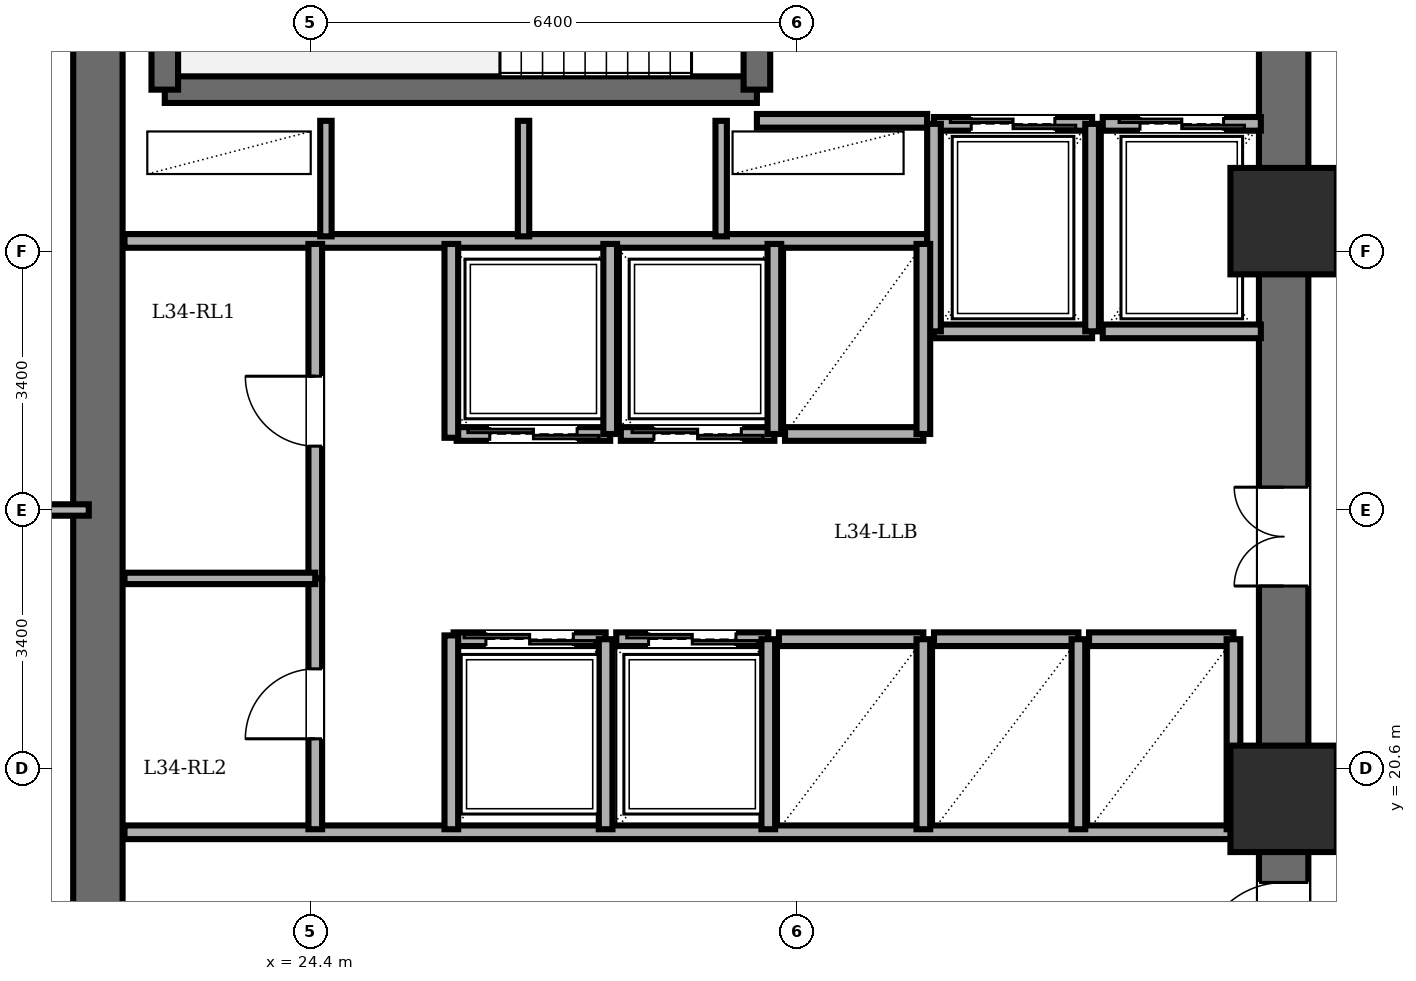
"""IFC4 building model, lengths in metres.
Left out: names, types, materials, properties, quantities, classifications, styles, units other than length and angle.
Written with IfcOpenShell. Run it as: python <this file> out.ifc"""

import sys

from ifc_helpers import new_model, si_unit, direction, frame, frame_2d, origin, origin_2d, place, context, subcontext, project, spatial, rectangle, extrude, element, fill, save


model = new_model("IFC4")
c1 = context("Model", 3, precision=1e-05, world=origin(), true_north=direction((0.0, 1.0)))
c2 = subcontext(c1, "Body", "Model", "MODEL_VIEW")
j1 = project(units=[si_unit("LENGTHUNIT", "METRE"), si_unit("PLANEANGLEUNIT", "RADIAN")], contexts=[c1])
p1 = place(None, origin())
s1 = spatial("IfcSite", under=j1, at=p1, CompositionType="ELEMENT")
p2 = place(p1, origin())
s2 = spatial("IfcBuilding", under=s1, at=p2, CompositionType="ELEMENT")
p3 = place(p2, frame((0.0, 0.0, 129.5)))
s3 = spatial("IfcBuildingStorey", under=s2, at=p3, CompositionType="ELEMENT", Elevation=129.5)
for number, where, z_axis, x_axis in (
    (1, (37.2, 20.2, 0.0), (0.0, 0.0, 1.0), (1.0, 0.0, 0.0)),
    (2, (37.2, 27.8, 0.0), (0.0, 0.0, 1.0), (1.0, 0.0, 0.0)),
):
    element("IfcColumn", number, at=place(p3, frame(where, z_axis=z_axis, x_axis=x_axis)), inside=s3, PredefinedType="COLUMN", context=c2, shape_type="SweptSolid", body=[
        extrude(rectangle(XDim=1.4, YDim=1.4, at=origin_2d()), origin(), (0.0, 0.0, 1.0), 3.6),
    ])
p4 = place(p3, frame((21.6, 14.4, 0.0), z_axis=(0.0, 0.0, 1.0), x_axis=(0.0, 1.0, 0.0)))
e3 = element("IfcWall", 3, at=p4, inside=s3, PredefinedType="SHEAR", context=c2, shape_type="SweptSolid", body=[
    extrude(rectangle(XDim=19.2, YDim=0.65, at=frame_2d((9.6, 0.0))), origin(), (0.0, 0.0, 1.0), 3.36),
])
p5 = place(p3, frame((37.2, 14.4, 0.0), z_axis=(0.0, 0.0, 1.0), x_axis=(0.0, 1.0, 0.0)))
e4 = element("IfcWall", 4, at=p5, inside=s3, PredefinedType="SHEAR", context=c2, shape_type="SweptSolid", body=[
    extrude(rectangle(XDim=19.2, YDim=0.65, at=frame_2d((9.6, 0.0))), origin(), (0.0, 0.0, 1.0), 3.36),
])
p6 = place(p5, frame((15.8, 0.0, 0.0)))
e5 = element("IfcOpeningElement", 5, at=p6, cuts=e4, PredefinedType="OPENING", context=c2, shape_type="SweptSolid", body=[
    extrude(rectangle(XDim=1.15, YDim=2.15, at=frame_2d((0.575, 1.075))), frame((0.0, 0.335, 0.0), z_axis=(0.0, -1.0, 0.0), x_axis=(1.0, 0.0, 0.0)), (0.0, 0.0, 1.0), 0.67),
])
p7 = place(p5, frame((3.6, 0.0, 0.0)))
e6 = element("IfcOpeningElement", 6, at=p7, cuts=e4, PredefinedType="OPENING", context=c2, shape_type="SweptSolid", body=[
    extrude(rectangle(XDim=1.1, YDim=2.15, at=frame_2d((0.55, 1.075))), frame((0.0, 0.335, 0.0), z_axis=(0.0, -1.0, 0.0), x_axis=(1.0, 0.0, 0.0)), (0.0, 0.0, 1.0), 0.67),
])
p8 = place(p5, frame((8.6, 0.0, 0.0)))
e7 = element("IfcOpeningElement", 7, at=p8, cuts=e4, PredefinedType="OPENING", context=c2, shape_type="SweptSolid", body=[
    extrude(rectangle(XDim=1.3, YDim=2.2, at=frame_2d((0.65, 1.1))), frame((0.0, 0.335, 0.0), z_axis=(0.0, -1.0, 0.0), x_axis=(1.0, 0.0, 0.0)), (0.0, 0.0, 1.0), 0.67),
])
p9 = place(p3, frame((22.48, 29.53, 0.0), z_axis=(0.0, 0.0, 1.0), x_axis=(1.0, 0.0, 0.0)))
e8 = element("IfcWall", 8, at=p9, inside=s3, PredefinedType="SOLIDWALL", context=c2, shape_type="SweptSolid", body=[
    extrude(rectangle(XDim=7.79, YDim=0.35, at=frame_2d((3.895, 0.0))), origin(), (0.0, 0.0, 1.0), 3.36),
])
p10 = place(p3, frame((22.48, 29.53, 0.0), z_axis=(0.0, 0.0, 1.0), x_axis=(0.0, 1.0, 0.0)))
e9 = element("IfcWall", 9, at=p10, inside=s3, PredefinedType="SOLIDWALL", context=c2, shape_type="SweptSolid", body=[
    extrude(rectangle(XDim=3.58, YDim=0.35, at=frame_2d((1.79, 0.0))), origin(), (0.0, 0.0, 1.0), 3.36),
])
p11 = place(p3, frame((30.27, 29.53, 0.0), z_axis=(0.0, 0.0, 1.0), x_axis=(0.0, 1.0, 0.0)))
e10 = element("IfcWall", 10, at=p11, inside=s3, PredefinedType="SOLIDWALL", context=c2, shape_type="SweptSolid", body=[
    extrude(rectangle(XDim=3.58, YDim=0.35, at=frame_2d((1.79, 0.0))), origin(), (0.0, 0.0, 1.0), 3.36),
])
p12 = place(p11, frame((1.25, 0.0, 0.0)))
e11 = element("IfcOpeningElement", 11, at=p12, cuts=e10, PredefinedType="OPENING", context=c2, shape_type="SweptSolid", body=[
    extrude(rectangle(XDim=1.1, YDim=2.15, at=frame_2d((0.55, 1.075))), frame((0.0, 0.185, 0.0), z_axis=(0.0, -1.0, 0.0), x_axis=(1.0, 0.0, 0.0)), (0.0, 0.0, 1.0), 0.37),
])
p13 = place(p3, frame((30.27, 29.12, 0.0), z_axis=(0.0, 0.0, 1.0), x_axis=(1.0, 0.0, 0.0)))
e12 = element("IfcWall", 12, at=p13, inside=s3, PredefinedType="PARTITIONING", context=c2, shape_type="SweptSolid", body=[
    extrude(rectangle(XDim=2.24, YDim=0.18, at=frame_2d((1.12, 0.0))), origin(), (0.0, 0.0, 1.0), 3.36),
])
p14 = place(p3, frame((21.95, 27.54, 0.0), z_axis=(0.0, 0.0, 1.0), x_axis=(1.0, 0.0, 0.0)))
e13 = element("IfcWall", 13, at=p14, inside=s3, PredefinedType="PARTITIONING", context=c2, shape_type="SweptSolid", body=[
    extrude(rectangle(XDim=10.56, YDim=0.18, at=frame_2d((5.28, 0.0))), origin(), (0.0, 0.0, 1.0), 3.36),
])
for number, where, z_axis, x_axis in (
    (14, (24.6, 27.6, 0.0), (0.0, 0.0, 1.0), (0.0, 1.0, 0.0)),
    (15, (27.2, 27.6, 0.0), (0.0, 0.0, 1.0), (0.0, 1.0, 0.0)),
    (16, (29.8, 27.6, 0.0), (0.0, 0.0, 1.0), (0.0, 1.0, 0.0)),
):
    element("IfcWall", number, at=place(p3, frame(where, z_axis=z_axis, x_axis=x_axis)), inside=s3, PredefinedType="PARTITIONING", context=c2, shape_type="SweptSolid", body=[
        extrude(rectangle(XDim=1.52, YDim=0.15, at=frame_2d((0.76, 0.0))), origin(), (0.0, 0.0, 1.0), 3.36),
    ])
p15 = place(p3, frame((21.95, 19.76, 0.0), z_axis=(0.0, 0.0, 1.0), x_axis=(1.0, 0.0, 0.0)))
e17 = element("IfcWall", 17, at=p15, inside=s3, PredefinedType="PARTITIONING", context=c2, shape_type="SweptSolid", body=[
    extrude(rectangle(XDim=14.87, YDim=0.18, at=frame_2d((7.435, 0.0))), origin(), (0.0, 0.0, 1.0), 3.36),
])
p16 = place(p3, frame((32.6, 29.08, 0.0), z_axis=(0.0, 0.0, 1.0), x_axis=(1.0, 0.0, 0.0)))
e18 = element("IfcWall", 18, at=p16, inside=s3, PredefinedType="PARTITIONING", context=c2, shape_type="SweptSolid", body=[
    extrude(rectangle(XDim=2.08, YDim=0.18, at=frame_2d((1.04, 0.0))), origin(), (0.0, 0.0, 1.0), 3.36),
])
p17 = place(p16, frame((0.49, 0.0, 0.0)))
e19 = element("IfcOpeningElement", 19, at=p17, cuts=e18, PredefinedType="OPENING", context=c2, shape_type="SweptSolid", body=[
    extrude(rectangle(XDim=1.1, YDim=2.2, at=frame_2d((0.55, 1.1))), frame((0.0, 0.1, 0.0), z_axis=(0.0, -1.0, 0.0), x_axis=(1.0, 0.0, 0.0)), (0.0, 0.0, 1.0), 0.2),
])
p18 = place(p3, frame((34.68, 26.35, 0.0), z_axis=(0.0, 0.0, 1.0), x_axis=(-1.0, 0.0, 0.0)))
e20 = element("IfcWall", 20, at=p18, inside=s3, PredefinedType="PARTITIONING", context=c2, shape_type="SweptSolid", body=[
    extrude(rectangle(XDim=2.08, YDim=0.18, at=frame_2d((1.04, 0.0))), origin(), (0.0, 0.0, 1.0), 3.36),
])
for number, where, z_axis, x_axis in (
    (21, (34.68, 26.35, 0.0), (0.0, 0.0, 1.0), (0.0, 1.0, 0.0)),
    (22, (32.6, 29.08, 0.0), (0.0, 0.0, 1.0), (0.0, -1.0, 0.0)),
):
    element("IfcWall", number, at=place(p3, frame(where, z_axis=z_axis, x_axis=x_axis)), inside=s3, PredefinedType="PARTITIONING", context=c2, shape_type="SweptSolid", body=[
        extrude(rectangle(XDim=2.73, YDim=0.18, at=frame_2d((1.365, 0.0))), origin(), (0.0, 0.0, 1.0), 3.36),
    ])
p19 = place(p3, frame((34.82, 29.08, 0.0), z_axis=(0.0, 0.0, 1.0), x_axis=(1.0, 0.0, 0.0)))
e23 = element("IfcWall", 23, at=p19, inside=s3, PredefinedType="PARTITIONING", context=c2, shape_type="SweptSolid", body=[
    extrude(rectangle(XDim=2.08, YDim=0.18, at=frame_2d((1.04, 0.0))), origin(), (0.0, 0.0, 1.0), 3.36),
])
p20 = place(p19, frame((0.49, 0.0, 0.0)))
e24 = element("IfcOpeningElement", 24, at=p20, cuts=e23, PredefinedType="OPENING", context=c2, shape_type="SweptSolid", body=[
    extrude(rectangle(XDim=1.1, YDim=2.2, at=frame_2d((0.55, 1.1))), frame((0.0, 0.1, 0.0), z_axis=(0.0, -1.0, 0.0), x_axis=(1.0, 0.0, 0.0)), (0.0, 0.0, 1.0), 0.2),
])
p21 = place(p3, frame((36.9, 26.35, 0.0), z_axis=(0.0, 0.0, 1.0), x_axis=(-1.0, 0.0, 0.0)))
e25 = element("IfcWall", 25, at=p21, inside=s3, PredefinedType="PARTITIONING", context=c2, shape_type="SweptSolid", body=[
    extrude(rectangle(XDim=2.08, YDim=0.18, at=frame_2d((1.04, 0.0))), origin(), (0.0, 0.0, 1.0), 3.36),
])
p22 = place(p3, frame((28.34, 25.0, 0.0), z_axis=(0.0, 0.0, 1.0), x_axis=(-1.0, 0.0, 0.0)))
e26 = element("IfcWall", 26, at=p22, inside=s3, PredefinedType="PARTITIONING", context=c2, shape_type="SweptSolid", body=[
    extrude(rectangle(XDim=2.02, YDim=0.18, at=frame_2d((1.01, 0.0))), origin(), (0.0, 0.0, 1.0), 3.36),
])
p23 = place(p22, frame((0.435, 0.0, 0.0)))
e27 = element("IfcOpeningElement", 27, at=p23, cuts=e26, PredefinedType="OPENING", context=c2, shape_type="SweptSolid", body=[
    extrude(rectangle(XDim=1.15, YDim=2.2, at=frame_2d((0.575, 1.1))), frame((0.0, 0.1, 0.0), z_axis=(0.0, -1.0, 0.0), x_axis=(1.0, 0.0, 0.0)), (0.0, 0.0, 1.0), 0.2),
])
p24 = place(p3, frame((28.34, 25.0, 0.0), z_axis=(0.0, 0.0, 1.0), x_axis=(0.0, 1.0, 0.0)))
e28 = element("IfcWall", 28, at=p24, inside=s3, PredefinedType="PARTITIONING", context=c2, shape_type="SweptSolid", body=[
    extrude(rectangle(XDim=2.5, YDim=0.18, at=frame_2d((1.25, 0.0))), origin(), (0.0, 0.0, 1.0), 3.36),
])
p25 = place(p3, frame((30.5, 25.0, 0.0), z_axis=(0.0, 0.0, 1.0), x_axis=(-1.0, 0.0, 0.0)))
e29 = element("IfcWall", 29, at=p25, inside=s3, PredefinedType="PARTITIONING", context=c2, shape_type="SweptSolid", body=[
    extrude(rectangle(XDim=2.02, YDim=0.18, at=frame_2d((1.01, 0.0))), origin(), (0.0, 0.0, 1.0), 3.36),
])
p26 = place(p25, frame((0.435, 0.0, 0.0)))
e30 = element("IfcOpeningElement", 30, at=p26, cuts=e29, PredefinedType="OPENING", context=c2, shape_type="SweptSolid", body=[
    extrude(rectangle(XDim=1.15, YDim=2.2, at=frame_2d((0.575, 1.1))), frame((0.0, 0.1, 0.0), z_axis=(0.0, -1.0, 0.0), x_axis=(1.0, 0.0, 0.0)), (0.0, 0.0, 1.0), 0.2),
])
p27 = place(p3, frame((30.5, 25.0, 0.0), z_axis=(0.0, 0.0, 1.0), x_axis=(0.0, 1.0, 0.0)))
e31 = element("IfcWall", 31, at=p27, inside=s3, PredefinedType="PARTITIONING", context=c2, shape_type="SweptSolid", body=[
    extrude(rectangle(XDim=2.5, YDim=0.18, at=frame_2d((1.25, 0.0))), origin(), (0.0, 0.0, 1.0), 3.36),
])
p28 = place(p3, frame((26.28, 22.3, 0.0), z_axis=(0.0, 0.0, 1.0), x_axis=(1.0, 0.0, 0.0)))
e32 = element("IfcWall", 32, at=p28, inside=s3, PredefinedType="PARTITIONING", context=c2, shape_type="SweptSolid", body=[
    extrude(rectangle(XDim=2.0, YDim=0.18, at=frame_2d((1.0, 0.0))), origin(), (0.0, 0.0, 1.0), 3.36),
])
p29 = place(p28, frame((0.425, 0.0, 0.0)))
e33 = element("IfcOpeningElement", 33, at=p29, cuts=e32, PredefinedType="OPENING", context=c2, shape_type="SweptSolid", body=[
    extrude(rectangle(XDim=1.15, YDim=2.2, at=frame_2d((0.575, 1.1))), frame((0.0, 0.1, 0.0), z_axis=(0.0, -1.0, 0.0), x_axis=(1.0, 0.0, 0.0)), (0.0, 0.0, 1.0), 0.2),
])
p30 = place(p3, frame((28.28, 19.8, 0.0), z_axis=(0.0, 0.0, 1.0), x_axis=(0.0, 1.0, 0.0)))
e34 = element("IfcWall", 34, at=p30, inside=s3, PredefinedType="PARTITIONING", context=c2, shape_type="SweptSolid", body=[
    extrude(rectangle(XDim=2.5, YDim=0.18, at=frame_2d((1.25, 0.0))), origin(), (0.0, 0.0, 1.0), 3.36),
])
p31 = place(p3, frame((28.42, 22.3, 0.0), z_axis=(0.0, 0.0, 1.0), x_axis=(1.0, 0.0, 0.0)))
e35 = element("IfcWall", 35, at=p31, inside=s3, PredefinedType="PARTITIONING", context=c2, shape_type="SweptSolid", body=[
    extrude(rectangle(XDim=2.0, YDim=0.18, at=frame_2d((1.0, 0.0))), origin(), (0.0, 0.0, 1.0), 3.36),
])
p32 = place(p31, frame((0.425, 0.0, 0.0)))
e36 = element("IfcOpeningElement", 36, at=p32, cuts=e35, PredefinedType="OPENING", context=c2, shape_type="SweptSolid", body=[
    extrude(rectangle(XDim=1.15, YDim=2.2, at=frame_2d((0.575, 1.1))), frame((0.0, 0.1, 0.0), z_axis=(0.0, -1.0, 0.0), x_axis=(1.0, 0.0, 0.0)), (0.0, 0.0, 1.0), 0.2),
])
p33 = place(p3, frame((30.42, 19.8, 0.0), z_axis=(0.0, 0.0, 1.0), x_axis=(0.0, 1.0, 0.0)))
e37 = element("IfcWall", 37, at=p33, inside=s3, PredefinedType="PARTITIONING", context=c2, shape_type="SweptSolid", body=[
    extrude(rectangle(XDim=2.5, YDim=0.18, at=frame_2d((1.25, 0.0))), origin(), (0.0, 0.0, 1.0), 3.36),
])
p34 = place(p3, frame((32.46, 25.0, 0.0), z_axis=(0.0, 0.0, 1.0), x_axis=(-1.0, 0.0, 0.0)))
e38 = element("IfcWall", 38, at=p34, inside=s3, PredefinedType="PARTITIONING", context=c2, shape_type="SweptSolid", body=[
    extrude(rectangle(XDim=1.82, YDim=0.18, at=frame_2d((0.91, 0.0))), origin(), (0.0, 0.0, 1.0), 3.36),
])
p35 = place(p3, frame((32.46, 25.0, 0.0), z_axis=(0.0, 0.0, 1.0), x_axis=(0.0, 1.0, 0.0)))
e39 = element("IfcWall", 39, at=p35, inside=s3, PredefinedType="PARTITIONING", context=c2, shape_type="SweptSolid", body=[
    extrude(rectangle(XDim=2.5, YDim=0.18, at=frame_2d((1.25, 0.0))), origin(), (0.0, 0.0, 1.0), 3.36),
])
p36 = place(p3, frame((30.56, 22.3, 0.0), z_axis=(0.0, 0.0, 1.0), x_axis=(1.0, 0.0, 0.0)))
e40 = element("IfcWall", 40, at=p36, inside=s3, PredefinedType="PARTITIONING", context=c2, shape_type="SweptSolid", body=[
    extrude(rectangle(XDim=1.9, YDim=0.18, at=frame_2d((0.95, 0.0))), origin(), (0.0, 0.0, 1.0), 3.36),
])
p37 = place(p3, frame((32.46, 19.8, 0.0), z_axis=(0.0, 0.0, 1.0), x_axis=(0.0, 1.0, 0.0)))
e41 = element("IfcWall", 41, at=p37, inside=s3, PredefinedType="PARTITIONING", context=c2, shape_type="SweptSolid", body=[
    extrude(rectangle(XDim=2.5, YDim=0.18, at=frame_2d((1.25, 0.0))), origin(), (0.0, 0.0, 1.0), 3.36),
])
p38 = place(p3, frame((32.6, 22.3, 0.0), z_axis=(0.0, 0.0, 1.0), x_axis=(1.0, 0.0, 0.0)))
e42 = element("IfcWall", 42, at=p38, inside=s3, PredefinedType="PARTITIONING", context=c2, shape_type="SweptSolid", body=[
    extrude(rectangle(XDim=1.9, YDim=0.18, at=frame_2d((0.95, 0.0))), origin(), (0.0, 0.0, 1.0), 3.36),
])
p39 = place(p3, frame((34.5, 19.8, 0.0), z_axis=(0.0, 0.0, 1.0), x_axis=(0.0, 1.0, 0.0)))
e43 = element("IfcWall", 43, at=p39, inside=s3, PredefinedType="PARTITIONING", context=c2, shape_type="SweptSolid", body=[
    extrude(rectangle(XDim=2.5, YDim=0.18, at=frame_2d((1.25, 0.0))), origin(), (0.0, 0.0, 1.0), 3.36),
])
p40 = place(p3, frame((34.64, 22.3, 0.0), z_axis=(0.0, 0.0, 1.0), x_axis=(1.0, 0.0, 0.0)))
e44 = element("IfcWall", 44, at=p40, inside=s3, PredefinedType="PARTITIONING", context=c2, shape_type="SweptSolid", body=[
    extrude(rectangle(XDim=1.9, YDim=0.18, at=frame_2d((0.95, 0.0))), origin(), (0.0, 0.0, 1.0), 3.36),
])
p41 = place(p3, frame((36.54, 19.8, 0.0), z_axis=(0.0, 0.0, 1.0), x_axis=(0.0, 1.0, 0.0)))
e45 = element("IfcWall", 45, at=p41, inside=s3, PredefinedType="PARTITIONING", context=c2, shape_type="SweptSolid", body=[
    extrude(rectangle(XDim=2.5, YDim=0.18, at=frame_2d((1.25, 0.0))), origin(), (0.0, 0.0, 1.0), 3.36),
])
p42 = place(p3, frame((24.46, 23.1, 0.0), z_axis=(0.0, 0.0, 1.0), x_axis=(0.0, 1.0, 0.0)))
e46 = element("IfcWall", 46, at=p42, inside=s3, PredefinedType="PARTITIONING", context=c2, shape_type="SweptSolid", body=[
    extrude(rectangle(XDim=4.4, YDim=0.18, at=frame_2d((2.2, 0.0))), origin(), (0.0, 0.0, 1.0), 3.36),
])
p43 = place(p42, frame((1.74, 0.0, 0.0)))
e47 = element("IfcOpeningElement", 47, at=p43, cuts=e46, PredefinedType="OPENING", context=c2, shape_type="SweptSolid", body=[
    extrude(rectangle(XDim=0.92, YDim=2.1, at=frame_2d((0.46, 1.05))), frame((0.0, 0.1, 0.0), z_axis=(0.0, -1.0, 0.0), x_axis=(1.0, 0.0, 0.0)), (0.0, 0.0, 1.0), 0.2),
])
p44 = place(p3, frame((24.46, 19.8, 0.0), z_axis=(0.0, 0.0, 1.0), x_axis=(0.0, 1.0, 0.0)))
e48 = element("IfcWall", 48, at=p44, inside=s3, PredefinedType="PARTITIONING", context=c2, shape_type="SweptSolid", body=[
    extrude(rectangle(XDim=3.3, YDim=0.18, at=frame_2d((1.65, 0.0))), origin(), (0.0, 0.0, 1.0), 3.36),
])
p45 = place(p44, frame((1.19, 0.0, 0.0)))
e49 = element("IfcOpeningElement", 49, at=p45, cuts=e48, PredefinedType="OPENING", context=c2, shape_type="SweptSolid", body=[
    extrude(rectangle(XDim=0.92, YDim=2.1, at=frame_2d((0.46, 1.05))), frame((0.0, 0.1, 0.0), z_axis=(0.0, -1.0, 0.0), x_axis=(1.0, 0.0, 0.0)), (0.0, 0.0, 1.0), 0.2),
])
p46 = place(p3, frame((21.95, 23.1, 0.0), z_axis=(0.0, 0.0, 1.0), x_axis=(1.0, 0.0, 0.0)))
e50 = element("IfcWall", 50, at=p46, inside=s3, PredefinedType="PARTITIONING", context=c2, shape_type="SweptSolid", body=[
    extrude(rectangle(XDim=2.51, YDim=0.15, at=frame_2d((1.255, 0.0))), origin(), (0.0, 0.0, 1.0), 3.36),
])
for number, where, z_axis, x_axis in (
    (51, (26.25, 24.95, 0.0), (0.0, 0.0, 1.0), (0.0, 1.0, 0.0)),
    (52, (26.25, 19.8, 0.0), (0.0, 0.0, 1.0), (0.0, 1.0, 0.0)),
):
    element("IfcWall", number, at=place(p3, frame(where, z_axis=z_axis, x_axis=x_axis)), inside=s3, PredefinedType="PARTITIONING", context=c2, shape_type="SweptSolid", body=[
        extrude(rectangle(XDim=2.55, YDim=0.18, at=frame_2d((1.275, 0.0))), origin(), (0.0, 0.0, 1.0), 3.36),
    ])
p47 = place(p3, frame((8.8, 24.0, 0.0), z_axis=(0.0, 0.0, 1.0), x_axis=(1.0, 0.0, 0.0)))
e53 = element("IfcWall", 53, at=p47, inside=s3, PredefinedType="PARTITIONING", context=c2, shape_type="SweptSolid", body=[
    extrude(rectangle(XDim=12.68, YDim=0.15, at=frame_2d((6.34, 0.0))), origin(), (0.0, 0.0, 1.0), 3.36),
])
p48 = place(p7, origin())
e54 = element("IfcDoor", 54, at=p48, inside=s3, OperationType="SINGLE_SWING_LEFT", PredefinedType="DOOR", context=c2, shape_type="SweptSolid", body=[
    extrude(rectangle(XDim=1.1, YDim=2.15, at=frame_2d((0.55, 1.075))), frame((0.0, 0.025, 0.0), z_axis=(0.0, -1.0, 0.0), x_axis=(1.0, 0.0, 0.0)), (0.0, 0.0, 1.0), 0.05),
])
fill(e6, e54)
p49 = place(p17, origin())
e55 = element("IfcDoor", 55, at=p49, inside=s3, OperationType="DOUBLE_DOOR_SLIDING", PredefinedType="DOOR", context=c2, shape_type="SweptSolid", body=[
    extrude(rectangle(XDim=1.1, YDim=2.2, at=frame_2d((0.55, 1.1))), frame((0.0, 0.025, 0.0), z_axis=(0.0, -1.0, 0.0), x_axis=(1.0, 0.0, 0.0)), (0.0, 0.0, 1.0), 0.05),
])
fill(e19, e55)
p50 = place(p20, origin())
e56 = element("IfcDoor", 56, at=p50, inside=s3, OperationType="DOUBLE_DOOR_SLIDING", PredefinedType="DOOR", context=c2, shape_type="SweptSolid", body=[
    extrude(rectangle(XDim=1.1, YDim=2.2, at=frame_2d((0.55, 1.1))), frame((0.0, 0.025, 0.0), z_axis=(0.0, -1.0, 0.0), x_axis=(1.0, 0.0, 0.0)), (0.0, 0.0, 1.0), 0.05),
])
fill(e24, e56)
p51 = place(p23, origin())
e57 = element("IfcDoor", 57, at=p51, inside=s3, OperationType="DOUBLE_DOOR_SLIDING", PredefinedType="DOOR", context=c2, shape_type="SweptSolid", body=[
    extrude(rectangle(XDim=1.15, YDim=2.2, at=frame_2d((0.575, 1.1))), frame((0.0, 0.025, 0.0), z_axis=(0.0, -1.0, 0.0), x_axis=(1.0, 0.0, 0.0)), (0.0, 0.0, 1.0), 0.05),
])
fill(e27, e57)
p52 = place(p26, origin())
e58 = element("IfcDoor", 58, at=p52, inside=s3, OperationType="DOUBLE_DOOR_SLIDING", PredefinedType="DOOR", context=c2, shape_type="SweptSolid", body=[
    extrude(rectangle(XDim=1.15, YDim=2.2, at=frame_2d((0.575, 1.1))), frame((0.0, 0.025, 0.0), z_axis=(0.0, -1.0, 0.0), x_axis=(1.0, 0.0, 0.0)), (0.0, 0.0, 1.0), 0.05),
])
fill(e30, e58)
p53 = place(p29, origin())
e59 = element("IfcDoor", 59, at=p53, inside=s3, OperationType="DOUBLE_DOOR_SLIDING", PredefinedType="DOOR", context=c2, shape_type="SweptSolid", body=[
    extrude(rectangle(XDim=1.15, YDim=2.2, at=frame_2d((0.575, 1.1))), frame((0.0, 0.025, 0.0), z_axis=(0.0, -1.0, 0.0), x_axis=(1.0, 0.0, 0.0)), (0.0, 0.0, 1.0), 0.05),
])
fill(e33, e59)
p54 = place(p32, origin())
e60 = element("IfcDoor", 60, at=p54, inside=s3, OperationType="DOUBLE_DOOR_SLIDING", PredefinedType="DOOR", context=c2, shape_type="SweptSolid", body=[
    extrude(rectangle(XDim=1.15, YDim=2.2, at=frame_2d((0.575, 1.1))), frame((0.0, 0.025, 0.0), z_axis=(0.0, -1.0, 0.0), x_axis=(1.0, 0.0, 0.0)), (0.0, 0.0, 1.0), 0.05),
])
fill(e36, e60)
p55 = place(p43, origin())
e61 = element("IfcDoor", 61, at=p55, inside=s3, OperationType="SINGLE_SWING_RIGHT", PredefinedType="DOOR", context=c2, shape_type="SweptSolid", body=[
    extrude(rectangle(XDim=0.92, YDim=2.1, at=frame_2d((0.46, 1.05))), frame((0.0, 0.025, 0.0), z_axis=(0.0, -1.0, 0.0), x_axis=(1.0, 0.0, 0.0)), (0.0, 0.0, 1.0), 0.05),
])
fill(e47, e61)
p56 = place(p45, origin())
e62 = element("IfcDoor", 62, at=p56, inside=s3, OperationType="SINGLE_SWING_LEFT", PredefinedType="DOOR", context=c2, shape_type="SweptSolid", body=[
    extrude(rectangle(XDim=0.92, YDim=2.1, at=frame_2d((0.46, 1.05))), frame((0.0, 0.025, 0.0), z_axis=(0.0, -1.0, 0.0), x_axis=(1.0, 0.0, 0.0)), (0.0, 0.0, 1.0), 0.05),
])
fill(e49, e62)
p57 = place(p8, origin())
e63 = element("IfcDoor", 63, at=p57, inside=s3, OperationType="DOUBLE_DOOR_SINGLE_SWING", PredefinedType="DOOR", context=c2, shape_type="SweptSolid", body=[
    extrude(rectangle(XDim=1.3, YDim=2.2, at=frame_2d((0.65, 1.1))), frame((0.0, 0.025, 0.0), z_axis=(0.0, -1.0, 0.0), x_axis=(1.0, 0.0, 0.0)), (0.0, 0.0, 1.0), 0.05),
])
fill(e7, e63)
save(model, sys.argv[1])
